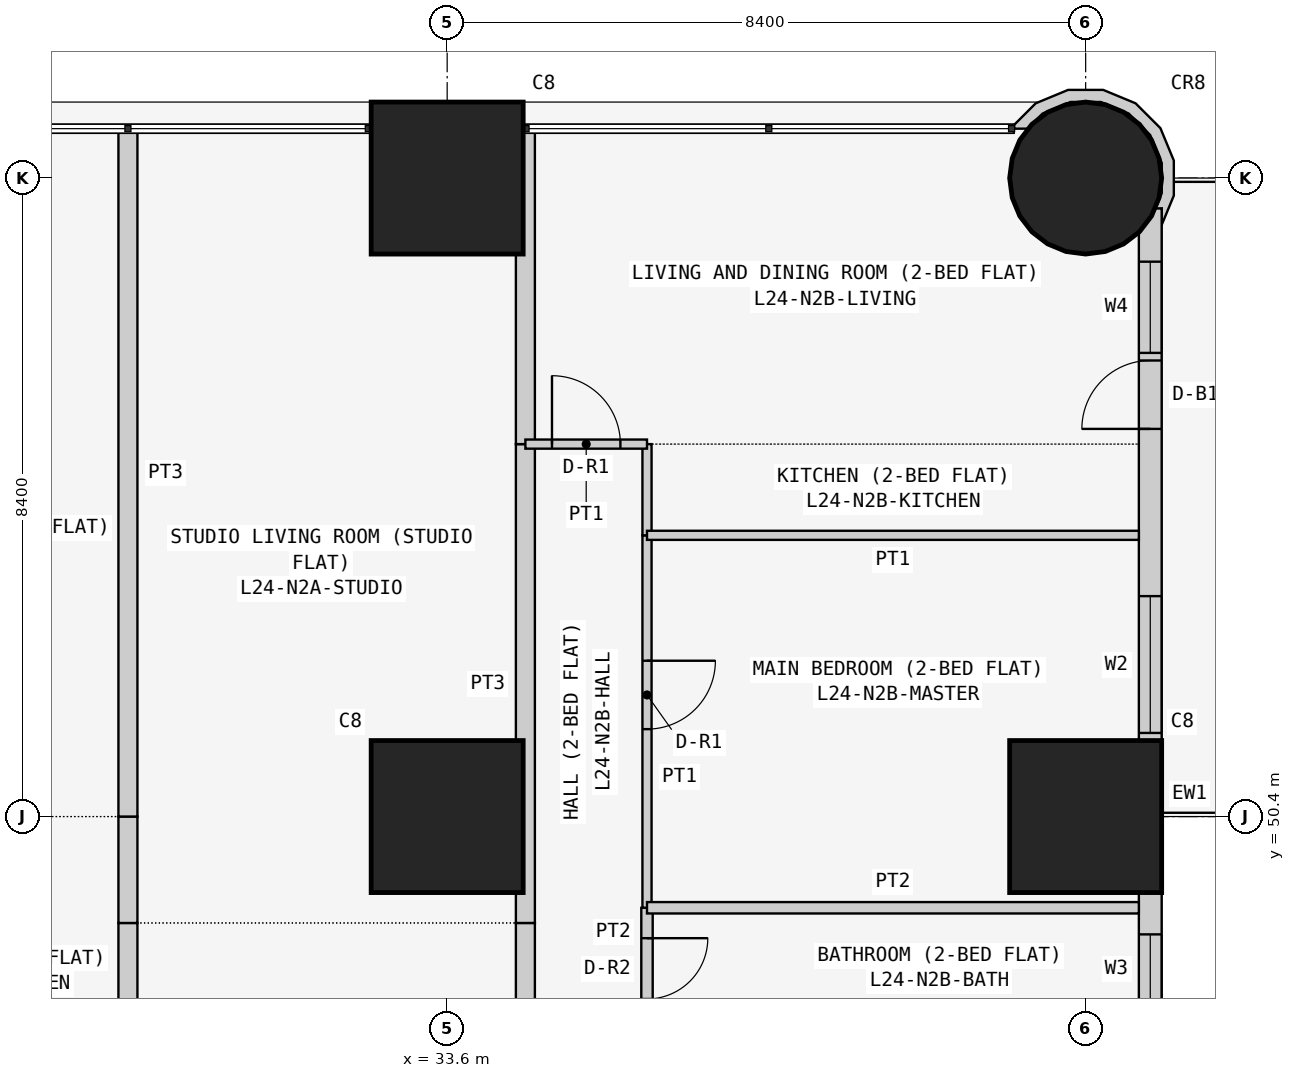
"""IFC4 building model, lengths in metres.
Left out: names, types, materials, properties, quantities, classifications, styles, units other than length and angle.
Written with IfcOpenShell. Run it as: python <this file> out.ifc"""

import sys

from ifc_helpers import new_model, si_unit, direction, frame, frame_2d, origin, origin_2d, place, context, subcontext, project, spatial, polyline, rectangle, circle, outline, extrude, element, fill, save


model = new_model("IFC4")
c1 = context("Model", 3, precision=1e-05, world=origin(), true_north=direction((0.0, 1.0)))
c2 = subcontext(c1, "Body", "Model", "MODEL_VIEW")
j1 = project(units=[si_unit("LENGTHUNIT", "METRE"), si_unit("PLANEANGLEUNIT", "RADIAN")], contexts=[c1])
p1 = place(None, origin())
s1 = spatial("IfcSite", under=j1, at=p1, CompositionType="ELEMENT")
p2 = place(p1, origin())
s2 = spatial("IfcBuilding", under=s1, at=p2, CompositionType="ELEMENT")
p3 = place(p2, frame((0.0, 0.0, 95.7)))
s3 = spatial("IfcBuildingStorey", under=s2, at=p3, CompositionType="ELEMENT", Elevation=95.7)
for number, where, z_axis, x_axis in (
    (1, (33.6, 50.4, 0.0), (0.0, 0.0, 1.0), (1.0, 0.0, 0.0)),
    (2, (33.6, 58.8, 0.0), (0.0, 0.0, 1.0), (1.0, 0.0, 0.0)),
    (3, (42.0, 50.4, 0.0), (0.0, 0.0, 1.0), (1.0, 0.0, 0.0)),
):
    element("IfcColumn", number, at=place(p3, frame(where, z_axis=z_axis, x_axis=x_axis)), inside=s3, PredefinedType="COLUMN", context=c2, shape_type="SweptSolid", body=[
        extrude(rectangle(XDim=2.0, YDim=2.0, at=origin_2d()), origin(), (0.0, 0.0, 1.0), 3.6),
    ])
p4 = place(p3, frame((42.0, 58.8, 0.0), z_axis=(0.0, 0.0, 1.0), x_axis=(1.0, 0.0, 0.0)))
e4 = element("IfcColumn", 4, at=p4, inside=s3, PredefinedType="COLUMN", context=c2, shape_type="SweptSolid", body=[
    extrude(circle(Radius=1.0, at=origin_2d()), origin(), (0.0, 0.0, 1.0), 3.6),
])
p5 = place(p3, frame((42.85, 43.0, 0.0), z_axis=(0.0, 0.0, 1.0), x_axis=(0.0, 1.0, 0.0)))
e5 = element("IfcWall", 5, at=p5, inside=s3, PredefinedType="SOLIDWALL", context=c2, shape_type="SweptSolid", body=[
    extrude(rectangle(XDim=15.4, YDim=0.3, at=frame_2d((7.7, 0.0))), origin(), (0.0, 0.0, 1.0), 3.45),
])
p6 = place(p5, frame((1.2, 0.0, 0.9)))
e6 = element("IfcOpeningElement", 6, at=p6, cuts=e5, PredefinedType="OPENING", context=c2, shape_type="SweptSolid", body=[
    extrude(rectangle(XDim=1.8, YDim=1.5, at=frame_2d((0.9, 0.75))), frame((0.0, 0.16, 0.0), z_axis=(0.0, -1.0, 0.0), x_axis=(1.0, 0.0, 0.0)), (0.0, 0.0, 1.0), 0.32),
])
p7 = place(p5, frame((4.95, 0.0, 1.5)))
e7 = element("IfcOpeningElement", 7, at=p7, cuts=e5, PredefinedType="OPENING", context=c2, shape_type="SweptSolid", body=[
    extrude(rectangle(XDim=0.9, YDim=0.7, at=frame_2d((0.45, 0.35))), frame((0.0, 0.16, 0.0), z_axis=(0.0, -1.0, 0.0), x_axis=(1.0, 0.0, 0.0)), (0.0, 0.0, 1.0), 0.32),
])
p8 = place(p5, frame((8.5, 0.0, 0.9)))
e8 = element("IfcOpeningElement", 8, at=p8, cuts=e5, PredefinedType="OPENING", context=c2, shape_type="SweptSolid", body=[
    extrude(rectangle(XDim=1.8, YDim=1.5, at=frame_2d((0.9, 0.75))), frame((0.0, 0.16, 0.0), z_axis=(0.0, -1.0, 0.0), x_axis=(1.0, 0.0, 0.0)), (0.0, 0.0, 1.0), 0.32),
])
p9 = place(p5, frame((12.5, 0.0, 0.0)))
e9 = element("IfcOpeningElement", 9, at=p9, cuts=e5, PredefinedType="OPENING", context=c2, shape_type="SweptSolid", body=[
    extrude(rectangle(XDim=0.9, YDim=2.4, at=frame_2d((0.45, 1.2))), frame((0.0, 0.16, 0.0), z_axis=(0.0, -1.0, 0.0), x_axis=(1.0, 0.0, 0.0)), (0.0, 0.0, 1.0), 0.32),
])
p10 = place(p5, frame((13.5, 0.0, 0.9)))
e10 = element("IfcOpeningElement", 10, at=p10, cuts=e5, PredefinedType="OPENING", context=c2, shape_type="SweptSolid", body=[
    extrude(rectangle(XDim=1.2, YDim=1.5, at=frame_2d((0.6, 0.75))), frame((0.0, 0.16, 0.0), z_axis=(0.0, -1.0, 0.0), x_axis=(1.0, 0.0, 0.0)), (0.0, 0.0, 1.0), 0.32),
])
p11 = place(p3, frame((42.919, 58.233, 0.0), z_axis=(0.0, 0.0, 1.0), x_axis=(0.555974394895, 0.831199417842, 0.0)))
e11 = element("IfcWall", 11, at=p11, inside=s3, PredefinedType="SOLIDWALL", context=c2, shape_type="SweptSolid", body=[
    extrude(outline(polyline([(0.414, -0.013), (0.797, 0.243), (1.053, 0.627), (1.143, 1.08), (1.053, 1.532), (0.796, 1.916), (0.413, 2.172), (0.017, 2.251), (-0.023, 2.224), (0.075, 2.077), (0.351, 2.022), (0.682, 1.801), (0.903, 1.47), (0.981, 1.08), (0.903, 0.689), (0.682, 0.358), (0.351, 0.137), (0.126, 0.092), (0.184, 0.026), (0.004, -0.095), (0.414, -0.013)])), origin(), (0.0, 0.0, 1.0), 3.45),
])
p12 = place(p3, frame((29.4, 49.0, 0.0), z_axis=(0.0, 0.0, 1.0), x_axis=(0.0, -1.0, 0.0)))
e12 = element("IfcWall", 12, at=p12, inside=s3, PredefinedType="PARTITIONING", context=c2, shape_type="SweptSolid", body=[
    extrude(rectangle(XDim=3.6, YDim=0.25, at=frame_2d((1.8, 0.0))), origin(), (0.0, 0.0, 1.0), 2.848),
])
p13 = place(p3, frame((29.4, 50.4, 0.0), z_axis=(0.0, 0.0, 1.0), x_axis=(0.0, -1.0, 0.0)))
e13 = element("IfcWall", 13, at=p13, inside=s3, PredefinedType="PARTITIONING", context=c2, shape_type="SweptSolid", body=[
    extrude(rectangle(XDim=1.4, YDim=0.25, at=frame_2d((0.7, 0.0))), origin(), (0.0, 0.0, 1.0), 2.848),
])
p14 = place(p3, frame((29.4, 59.45, 0.0), z_axis=(0.0, 0.0, 1.0), x_axis=(0.0, -1.0, 0.0)))
e14 = element("IfcWall", 14, at=p14, inside=s3, PredefinedType="PARTITIONING", context=c2, shape_type="SweptSolid", body=[
    extrude(rectangle(XDim=9.05, YDim=0.25, at=frame_2d((4.525, 0.0))), origin(), (0.0, 0.0, 1.0), 2.848),
])
p15 = place(p3, frame((34.629, 49.0, 0.0), z_axis=(0.0, 0.0, 1.0), x_axis=(0.0, -1.0, 0.0)))
e15 = element("IfcWall", 15, at=p15, inside=s3, PredefinedType="PARTITIONING", context=c2, shape_type="SweptSolid", body=[
    extrude(rectangle(XDim=3.6, YDim=0.25, at=frame_2d((1.8, 0.0))), origin(), (0.0, 0.0, 1.0), 3.45),
])
p16 = place(p3, frame((34.629, 55.3, 0.0), z_axis=(0.0, 0.0, 1.0), x_axis=(0.0, -1.0, 0.0)))
e16 = element("IfcWall", 16, at=p16, inside=s3, PredefinedType="PARTITIONING", context=c2, shape_type="SweptSolid", body=[
    extrude(rectangle(XDim=6.3, YDim=0.25, at=frame_2d((3.15, 0.0))), origin(), (0.0, 0.0, 1.0), 3.45),
])
p17 = place(p3, frame((34.629, 59.45, 0.0), z_axis=(0.0, 0.0, 1.0), x_axis=(0.0, -1.0, 0.0)))
e17 = element("IfcWall", 17, at=p17, inside=s3, PredefinedType="PARTITIONING", context=c2, shape_type="SweptSolid", body=[
    extrude(rectangle(XDim=4.15, YDim=0.25, at=frame_2d((2.075, 0.0))), origin(), (0.0, 0.0, 1.0), 3.45),
])
p18 = place(p3, frame((36.229, 49.2, 0.0), z_axis=(0.0, 0.0, 1.0), x_axis=(0.0, -1.0, 0.0)))
e18 = element("IfcWall", 18, at=p18, inside=s3, PredefinedType="PARTITIONING", context=c2, shape_type="SweptSolid", body=[
    extrude(rectangle(XDim=1.6, YDim=0.15, at=frame_2d((0.8, 0.0))), origin(), (0.0, 0.0, 1.0), 3.45),
])
p19 = place(p18, frame((0.4, 0.0, 0.0)))
e19 = element("IfcOpeningElement", 19, at=p19, cuts=e18, PredefinedType="OPENING", context=c2, shape_type="SweptSolid", body=[
    extrude(rectangle(XDim=0.8, YDim=2.1, at=frame_2d((0.4, 1.05))), frame((0.0, 0.085, 0.0), z_axis=(0.0, -1.0, 0.0), x_axis=(1.0, 0.0, 0.0)), (0.0, 0.0, 1.0), 0.17),
])
p20 = place(p3, frame((36.229, 54.1, 0.0), z_axis=(0.0, 0.0, 1.0), x_axis=(0.0, -1.0, 0.0)))
e20 = element("IfcWall", 20, at=p20, inside=s3, PredefinedType="PARTITIONING", context=c2, shape_type="SweptSolid", body=[
    extrude(rectangle(XDim=4.9, YDim=0.12, at=frame_2d((2.45, 0.0))), origin(), (0.0, 0.0, 1.0), 3.45),
])
p21 = place(p20, frame((1.65, 0.0, 0.0)))
e21 = element("IfcOpeningElement", 21, at=p21, cuts=e20, PredefinedType="OPENING", context=c2, shape_type="SweptSolid", body=[
    extrude(rectangle(XDim=0.9, YDim=2.1, at=frame_2d((0.45, 1.05))), frame((0.0, 0.07, 0.0), z_axis=(0.0, -1.0, 0.0), x_axis=(1.0, 0.0, 0.0)), (0.0, 0.0, 1.0), 0.14),
])
p22 = place(p3, frame((36.229, 55.3, 0.0), z_axis=(0.0, 0.0, 1.0), x_axis=(0.0, -1.0, 0.0)))
e22 = element("IfcWall", 22, at=p22, inside=s3, PredefinedType="PARTITIONING", context=c2, shape_type="SweptSolid", body=[
    extrude(rectangle(XDim=1.2, YDim=0.12, at=frame_2d((0.6, 0.0))), origin(), (0.0, 0.0, 1.0), 3.45),
])
p23 = place(p3, frame((34.629, 55.3, 0.0), z_axis=(0.0, 0.0, 1.0), x_axis=(1.0, 0.0, 0.0)))
e23 = element("IfcWall", 23, at=p23, inside=s3, PredefinedType="PARTITIONING", context=c2, shape_type="SweptSolid", body=[
    extrude(rectangle(XDim=1.6, YDim=0.12, at=frame_2d((0.8, 0.0))), origin(), (0.0, 0.0, 1.0), 3.45),
])
p24 = place(p23, frame((0.35, 0.0, 0.0)))
e24 = element("IfcOpeningElement", 24, at=p24, cuts=e23, PredefinedType="OPENING", context=c2, shape_type="SweptSolid", body=[
    extrude(rectangle(XDim=0.9, YDim=2.1, at=frame_2d((0.45, 1.05))), frame((0.0, 0.07, 0.0), z_axis=(0.0, -1.0, 0.0), x_axis=(1.0, 0.0, 0.0)), (0.0, 0.0, 1.0), 0.14),
])
p25 = place(p3, frame((36.229, 49.2, 0.0), z_axis=(0.0, 0.0, 1.0), x_axis=(1.0, 0.0, 0.0)))
e25 = element("IfcWall", 25, at=p25, inside=s3, PredefinedType="PARTITIONING", context=c2, shape_type="SweptSolid", body=[
    extrude(rectangle(XDim=6.471, YDim=0.15, at=frame_2d((3.235, 0.0))), origin(), (0.0, 0.0, 1.0), 3.45),
])
p26 = place(p3, frame((36.229, 54.1, 0.0), z_axis=(0.0, 0.0, 1.0), x_axis=(1.0, 0.0, 0.0)))
e26 = element("IfcWall", 26, at=p26, inside=s3, PredefinedType="PARTITIONING", context=c2, shape_type="SweptSolid", body=[
    extrude(rectangle(XDim=6.471, YDim=0.12, at=frame_2d((3.235, 0.0))), origin(), (0.0, 0.0, 1.0), 3.45),
])
p27 = place(p7, origin())
e27 = element("IfcWindow", 27, at=p27, inside=s3, PartitioningType="SINGLE_PANEL", PredefinedType="WINDOW", context=c2, shape_type="SweptSolid", body=[
    extrude(rectangle(XDim=0.9, YDim=0.7, at=frame_2d((0.45, 0.35))), frame((0.0, 0.03, 0.0), z_axis=(0.0, -1.0, 0.0), x_axis=(1.0, 0.0, 0.0)), (0.0, 0.0, 1.0), 0.06),
])
fill(e7, e27)
p28 = place(p8, origin())
e28 = element("IfcWindow", 28, at=p28, inside=s3, PartitioningType="SINGLE_PANEL", PredefinedType="WINDOW", context=c2, shape_type="SweptSolid", body=[
    extrude(rectangle(XDim=1.8, YDim=1.5, at=frame_2d((0.9, 0.75))), frame((0.0, 0.03, 0.0), z_axis=(0.0, -1.0, 0.0), x_axis=(1.0, 0.0, 0.0)), (0.0, 0.0, 1.0), 0.06),
])
fill(e8, e28)
p29 = place(p9, origin())
e29 = element("IfcDoor", 29, at=p29, inside=s3, OperationType="SINGLE_SWING_LEFT", PredefinedType="DOOR", context=c2, shape_type="SweptSolid", body=[
    extrude(rectangle(XDim=0.9, YDim=2.4, at=frame_2d((0.45, 1.2))), frame((0.0, 0.025, 0.0), z_axis=(0.0, -1.0, 0.0), x_axis=(1.0, 0.0, 0.0)), (0.0, 0.0, 1.0), 0.05),
])
fill(e9, e29)
p30 = place(p10, origin())
e30 = element("IfcWindow", 30, at=p30, inside=s3, PartitioningType="SINGLE_PANEL", PredefinedType="WINDOW", context=c2, shape_type="SweptSolid", body=[
    extrude(rectangle(XDim=1.2, YDim=1.5, at=frame_2d((0.6, 0.75))), frame((0.0, 0.03, 0.0), z_axis=(0.0, -1.0, 0.0), x_axis=(1.0, 0.0, 0.0)), (0.0, 0.0, 1.0), 0.06),
])
fill(e10, e30)
p31 = place(p19, origin())
e31 = element("IfcDoor", 31, at=p31, inside=s3, OperationType="SINGLE_SWING_LEFT", PredefinedType="DOOR", context=c2, shape_type="SweptSolid", body=[
    extrude(rectangle(XDim=0.8, YDim=2.1, at=frame_2d((0.4, 1.05))), frame((0.0, 0.025, 0.0), z_axis=(0.0, -1.0, 0.0), x_axis=(1.0, 0.0, 0.0)), (0.0, 0.0, 1.0), 0.05),
])
fill(e19, e31)
p32 = place(p21, origin())
e32 = element("IfcDoor", 32, at=p32, inside=s3, OperationType="SINGLE_SWING_LEFT", PredefinedType="DOOR", context=c2, shape_type="SweptSolid", body=[
    extrude(rectangle(XDim=0.9, YDim=2.1, at=frame_2d((0.45, 1.05))), frame((0.0, 0.025, 0.0), z_axis=(0.0, -1.0, 0.0), x_axis=(1.0, 0.0, 0.0)), (0.0, 0.0, 1.0), 0.05),
])
fill(e21, e32)
p33 = place(p24, origin())
e33 = element("IfcDoor", 33, at=p33, inside=s3, OperationType="SINGLE_SWING_LEFT", PredefinedType="DOOR", context=c2, shape_type="SweptSolid", body=[
    extrude(rectangle(XDim=0.9, YDim=2.1, at=frame_2d((0.45, 1.05))), frame((0.0, 0.025, 0.0), z_axis=(0.0, -1.0, 0.0), x_axis=(1.0, 0.0, 0.0)), (0.0, 0.0, 1.0), 0.05),
])
fill(e24, e33)
save(model, sys.argv[1])
